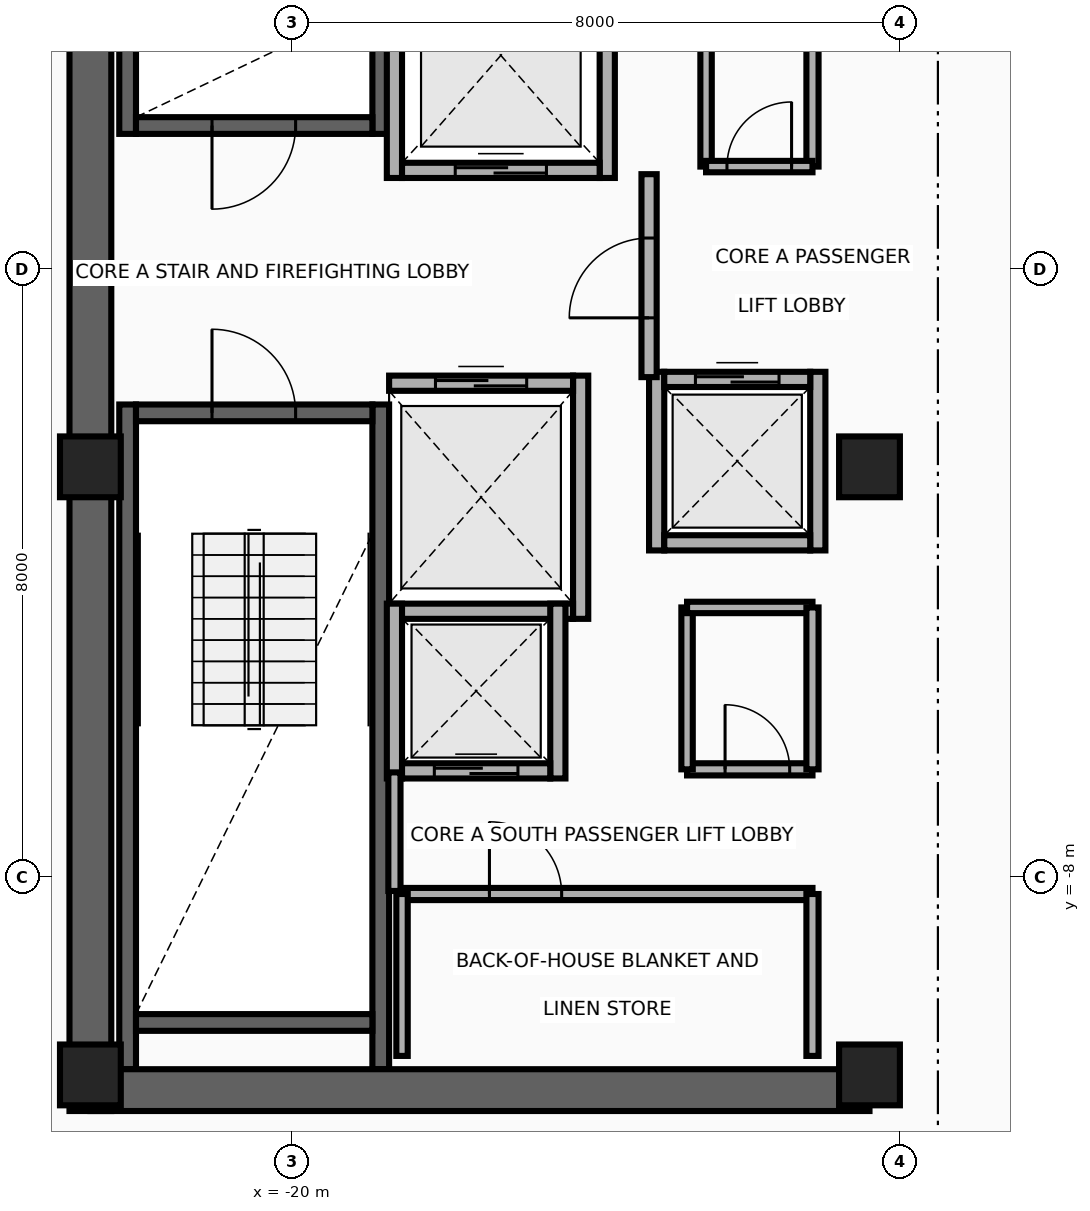
"""IFC4 building model, lengths in metres.
Left out: names, types, materials, properties, quantities, classifications, styles, units other than length and angle.
Written with IfcOpenShell. Run it as: python <this file> out.ifc"""

import sys

from ifc_helpers import new_model, si_unit, direction, frame, frame_2d, origin, origin_2d, place, context, subcontext, project, spatial, rectangle, extrude, source, transform, mapped, element, fill, save


model = new_model("IFC4")
c1 = context("Model", 3, precision=1e-05, world=origin(), true_north=direction((0.0, 1.0)))
c2 = subcontext(c1, "Body", "Model", "MODEL_VIEW")
j1 = project(units=[si_unit("LENGTHUNIT", "METRE"), si_unit("PLANEANGLEUNIT", "RADIAN")], contexts=[c1])
p1 = place(None, origin())
s1 = spatial("IfcSite", under=j1, at=p1, CompositionType="ELEMENT")
p2 = place(p1, origin())
s2 = spatial("IfcBuilding", under=s1, at=p2, CompositionType="ELEMENT")
p3 = place(p2, frame((0.0, 0.0, 254.5)))
s3 = spatial("IfcBuildingStorey", under=s2, at=p3, CompositionType="ELEMENT", Elevation=254.5)
for number, where, z_axis, x_axis in (
    (1, (-22.16, 1.78, 0.0), (0.0, 0.0, 1.0), (0.0, 1.0, 0.0)),
    (2, (-18.83, 1.78, 0.0), (0.0, 0.0, 1.0), (0.0, 1.0, 0.0)),
):
    element("IfcWall", number, at=place(p3, frame(where, z_axis=z_axis, x_axis=x_axis)), inside=s3, PredefinedType="SHEAR", context=c2, shape_type="SweptSolid", body=[
        extrude(rectangle(XDim=8.745, YDim=0.22, at=frame_2d((4.373, 0.0))), origin(), (0.0, 0.0, 1.0), 3.26),
    ])
p4 = place(p3, frame((-22.05, 1.89, 0.0), z_axis=(0.0, 0.0, 1.0), x_axis=(1.0, 0.0, 0.0)))
e3 = element("IfcWall", 3, at=p4, inside=s3, PredefinedType="SHEAR", context=c2, shape_type="SweptSolid", body=[
    extrude(rectangle(XDim=3.11, YDim=0.22, at=frame_2d((1.555, 0.0))), origin(), (0.0, 0.0, 1.0), 3.26),
])
p5 = place(p4, frame((1.0, 0.0, 0.0)))
e4 = element("IfcOpeningElement", 4, at=p5, cuts=e3, PredefinedType="OPENING", context=c2, shape_type="SweptSolid", body=[
    extrude(rectangle(XDim=1.1, YDim=2.15, at=frame_2d((0.55, 1.075))), frame((0.0, 0.125, 0.0), z_axis=(0.0, -1.0, 0.0), x_axis=(1.0, 0.0, 0.0)), (0.0, 0.0, 1.0), 0.25),
])
for number, where, z_axis, x_axis in (
    (5, (-22.16, -10.525, 0.0), (0.0, 0.0, 1.0), (0.0, 1.0, 0.0)),
    (6, (-18.83, -10.525, 0.0), (0.0, 0.0, 1.0), (0.0, 1.0, 0.0)),
):
    element("IfcWall", number, at=place(p3, frame(where, z_axis=z_axis, x_axis=x_axis)), inside=s3, PredefinedType="SHEAR", context=c2, shape_type="SweptSolid", body=[
        extrude(rectangle(XDim=8.745, YDim=0.22, at=frame_2d((4.373, 0.0))), origin(), (0.0, 0.0, 1.0), 3.26),
    ])
p6 = place(p3, frame((-22.05, -9.91, 0.0), z_axis=(0.0, 0.0, 1.0), x_axis=(1.0, 0.0, 0.0)))
e7 = element("IfcWall", 7, at=p6, inside=s3, PredefinedType="SHEAR", context=c2, shape_type="SweptSolid", body=[
    extrude(rectangle(XDim=3.11, YDim=0.22, at=frame_2d((1.555, 0.0))), origin(), (0.0, 0.0, 1.0), 3.26),
])
p7 = place(p3, frame((-22.05, -1.89, 0.0), z_axis=(0.0, 0.0, 1.0), x_axis=(1.0, 0.0, 0.0)))
e8 = element("IfcWall", 8, at=p7, inside=s3, PredefinedType="SHEAR", context=c2, shape_type="SweptSolid", body=[
    extrude(rectangle(XDim=3.11, YDim=0.22, at=frame_2d((1.555, 0.0))), origin(), (0.0, 0.0, 1.0), 3.26),
])
p8 = place(p7, frame((1.0, 0.0, 0.0)))
e9 = element("IfcOpeningElement", 9, at=p8, cuts=e8, PredefinedType="OPENING", context=c2, shape_type="SweptSolid", body=[
    extrude(rectangle(XDim=1.1, YDim=2.15, at=frame_2d((0.55, 1.075))), frame((0.0, 0.125, 0.0), z_axis=(0.0, -1.0, 0.0), x_axis=(1.0, 0.0, 0.0)), (0.0, 0.0, 1.0), 0.25),
])
p9 = place(p3, frame((-22.65, -11.075, 0.0), z_axis=(0.0, 0.0, 1.0), x_axis=(0.0, 1.0, 0.0)))
e10 = element("IfcWall", 10, at=p9, inside=s3, PredefinedType="SHEAR", context=c2, shape_type="SweptSolid", body=[
    extrude(rectangle(XDim=22.15, YDim=0.55, at=frame_2d((11.075, 0.0))), origin(), (0.0, 0.0, 1.0), 3.26),
])
p10 = place(p3, frame((-22.65, -10.8, 0.0), z_axis=(0.0, 0.0, 1.0), x_axis=(1.0, 0.0, 0.0)))
e11 = element("IfcWall", 11, at=p10, inside=s3, PredefinedType="SHEAR", context=c2, shape_type="SweptSolid", body=[
    extrude(rectangle(XDim=10.25, YDim=0.55, at=frame_2d((5.125, 0.0))), origin(), (0.0, 0.0, 1.0), 3.26),
])
m1 = source(origin(), c2, "Body", "SweptSolid", [
    extrude(rectangle(XDim=0.8, YDim=0.8, at=origin_2d()), origin(), (0.0, 0.0, 1.0), 3.5),
])
for number, where, z_axis, x_axis in (
    (12, (-22.65, -10.6, 0.0), (0.0, 0.0, 1.0), (1.0, 0.0, 0.0)),
    (13, (-12.4, -10.6, 0.0), (0.0, 0.0, 1.0), (1.0, 0.0, 0.0)),
    (14, (-22.65, -2.6, 0.0), (0.0, 0.0, 1.0), (1.0, 0.0, 0.0)),
    (15, (-12.4, -2.6, 0.0), (0.0, 0.0, 1.0), (1.0, 0.0, 0.0)),
):
    element("IfcColumn", number, at=place(p3, frame(where, z_axis=z_axis, x_axis=x_axis)), inside=s3, PredefinedType="COLUMN", context=c2, shape_type="MappedRepresentation", body=[
        mapped(m1, transform((0.0, 0.0, 0.0), x_axis=(1.0, 0.0, 0.0), y_axis=(0.0, 1.0, 0.0), z_axis=(0.0, 0.0, 1.0), scale=1.0)),
    ])
for number, where, z_axis, x_axis in (
    (16, (-18.65, 1.2, 0.0), (0.0, 0.0, 1.0), (0.0, 1.0, 0.0)),
    (17, (-15.85, 1.2, 0.0), (0.0, 0.0, 1.0), (0.0, 1.0, 0.0)),
):
    element("IfcWall", number, at=place(p3, frame(where, z_axis=z_axis, x_axis=x_axis)), inside=s3, PredefinedType="MOVABLE", context=c2, shape_type="SweptSolid", body=[
        extrude(rectangle(XDim=3.225, YDim=0.2, at=frame_2d((1.613, 0.0))), origin(), (0.0, 0.0, 1.0), 3.26),
    ])
p11 = place(p3, frame((-18.55, 1.3, 0.0), z_axis=(0.0, 0.0, 1.0), x_axis=(1.0, 0.0, 0.0)))
e18 = element("IfcWall", 18, at=p11, inside=s3, PredefinedType="MOVABLE", context=c2, shape_type="SweptSolid", body=[
    extrude(rectangle(XDim=2.6, YDim=0.2, at=frame_2d((1.3, 0.0))), origin(), (0.0, 0.0, 1.0), 3.26),
])
p12 = place(p11, frame((0.7, 0.0, 0.0)))
e19 = element("IfcOpeningElement", 19, at=p12, cuts=e18, PredefinedType="OPENING", context=c2, shape_type="SweptSolid", body=[
    extrude(rectangle(XDim=1.2, YDim=2.1, at=frame_2d((0.6, 1.05))), frame((0.0, 0.115, 0.0), z_axis=(0.0, -1.0, 0.0), x_axis=(1.0, 0.0, 0.0)), (0.0, 0.0, 1.0), 0.23),
])
p13 = place(p3, frame((-16.2, -4.6, 0.0), z_axis=(0.0, 0.0, 1.0), x_axis=(0.0, 1.0, 0.0)))
e20 = element("IfcWall", 20, at=p13, inside=s3, PredefinedType="MOVABLE", context=c2, shape_type="SweptSolid", body=[
    extrude(rectangle(XDim=3.2, YDim=0.2, at=frame_2d((1.6, 0.0))), origin(), (0.0, 0.0, 1.0), 3.26),
])
p14 = place(p3, frame((-18.72, -4.5, 0.0), z_axis=(0.0, 0.0, 1.0), x_axis=(1.0, 0.0, 0.0)))
e21 = element("IfcWall", 21, at=p14, inside=s3, PredefinedType="MOVABLE", context=c2, shape_type="SweptSolid", body=[
    extrude(rectangle(XDim=2.42, YDim=0.2, at=frame_2d((1.21, 0.0))), origin(), (0.0, 0.0, 1.0), 3.26),
])
p15 = place(p3, frame((-18.72, -1.5, 0.0), z_axis=(0.0, 0.0, 1.0), x_axis=(1.0, 0.0, 0.0)))
e22 = element("IfcWall", 22, at=p15, inside=s3, PredefinedType="MOVABLE", context=c2, shape_type="SweptSolid", body=[
    extrude(rectangle(XDim=2.42, YDim=0.2, at=frame_2d((1.21, 0.0))), origin(), (0.0, 0.0, 1.0), 3.26),
])
p16 = place(p15, frame((0.61, 0.0, 0.0)))
e23 = element("IfcOpeningElement", 23, at=p16, cuts=e22, PredefinedType="OPENING", context=c2, shape_type="SweptSolid", body=[
    extrude(rectangle(XDim=1.2, YDim=2.1, at=frame_2d((0.6, 1.05))), frame((0.0, 0.115, 0.0), z_axis=(0.0, -1.0, 0.0), x_axis=(1.0, 0.0, 0.0)), (0.0, 0.0, 1.0), 0.23),
])
for number, where, z_axis, x_axis in (
    (24, (-18.65, -6.7, 0.0), (0.0, 0.0, 1.0), (0.0, 1.0, 0.0)),
    (25, (-16.5, -6.7, 0.0), (0.0, 0.0, 1.0), (0.0, 1.0, 0.0)),
):
    element("IfcWall", number, at=place(p3, frame(where, z_axis=z_axis, x_axis=x_axis)), inside=s3, PredefinedType="MOVABLE", context=c2, shape_type="SweptSolid", body=[
        extrude(rectangle(XDim=2.3, YDim=0.2, at=frame_2d((1.15, 0.0))), origin(), (0.0, 0.0, 1.0), 3.26),
    ])
p17 = place(p3, frame((-18.55, -6.6, 0.0), z_axis=(0.0, 0.0, 1.0), x_axis=(1.0, 0.0, 0.0)))
e26 = element("IfcWall", 26, at=p17, inside=s3, PredefinedType="MOVABLE", context=c2, shape_type="SweptSolid", body=[
    extrude(rectangle(XDim=1.95, YDim=0.2, at=frame_2d((0.975, 0.0))), origin(), (0.0, 0.0, 1.0), 3.26),
])
p18 = place(p17, frame((0.425, 0.0, 0.0)))
e27 = element("IfcOpeningElement", 27, at=p18, cuts=e26, PredefinedType="OPENING", context=c2, shape_type="SweptSolid", body=[
    extrude(rectangle(XDim=1.1, YDim=2.1, at=frame_2d((0.55, 1.05))), frame((0.0, 0.115, 0.0), z_axis=(0.0, -1.0, 0.0), x_axis=(1.0, 0.0, 0.0)), (0.0, 0.0, 1.0), 0.23),
])
for number, where, z_axis, x_axis in (
    (28, (-15.2, -3.7, 0.0), (0.0, 0.0, 1.0), (0.0, 1.0, 0.0)),
    (29, (-13.08, -3.7, 0.0), (0.0, 0.0, 1.0), (0.0, 1.0, 0.0)),
):
    element("IfcWall", number, at=place(p3, frame(where, z_axis=z_axis, x_axis=x_axis)), inside=s3, PredefinedType="MOVABLE", context=c2, shape_type="SweptSolid", body=[
        extrude(rectangle(XDim=2.35, YDim=0.2, at=frame_2d((1.175, 0.0))), origin(), (0.0, 0.0, 1.0), 3.26),
    ])
p19 = place(p3, frame((-15.1, -3.6, 0.0), z_axis=(0.0, 0.0, 1.0), x_axis=(1.0, 0.0, 0.0)))
e30 = element("IfcWall", 30, at=p19, inside=s3, PredefinedType="MOVABLE", context=c2, shape_type="SweptSolid", body=[
    extrude(rectangle(XDim=1.92, YDim=0.2, at=frame_2d((0.96, 0.0))), origin(), (0.0, 0.0, 1.0), 3.26),
])
p20 = place(p3, frame((-15.1, -1.45, 0.0), z_axis=(0.0, 0.0, 1.0), x_axis=(1.0, 0.0, 0.0)))
e31 = element("IfcWall", 31, at=p20, inside=s3, PredefinedType="MOVABLE", context=c2, shape_type="SweptSolid", body=[
    extrude(rectangle(XDim=1.92, YDim=0.2, at=frame_2d((0.96, 0.0))), origin(), (0.0, 0.0, 1.0), 3.26),
])
p21 = place(p20, frame((0.41, 0.0, 0.0)))
e32 = element("IfcOpeningElement", 32, at=p21, cuts=e31, PredefinedType="OPENING", context=c2, shape_type="SweptSolid", body=[
    extrude(rectangle(XDim=1.1, YDim=2.1, at=frame_2d((0.55, 1.05))), frame((0.0, 0.115, 0.0), z_axis=(0.0, -1.0, 0.0), x_axis=(1.0, 0.0, 0.0)), (0.0, 0.0, 1.0), 0.23),
])
p22 = place(p3, frame((-15.3, -1.42, 0.0), z_axis=(0.0, 0.0, 1.0), x_axis=(0.0, 1.0, 0.0)))
e33 = element("IfcWall", 33, at=p22, inside=s3, PredefinedType="PARTITIONING", context=c2, shape_type="SweptSolid", body=[
    extrude(rectangle(XDim=2.67, YDim=0.2, at=frame_2d((1.335, 0.0))), origin(), (0.0, 0.0, 1.0), 3.26),
])
p23 = place(p22, frame((0.78, 0.0, 0.0)))
e34 = element("IfcOpeningElement", 34, at=p23, cuts=e33, PredefinedType="OPENING", context=c2, shape_type="SweptSolid", body=[
    extrude(rectangle(XDim=1.05, YDim=2.15, at=frame_2d((0.525, 1.075))), frame((0.0, 0.115, 0.0), z_axis=(0.0, -1.0, 0.0), x_axis=(1.0, 0.0, 0.0)), (0.0, 0.0, 1.0), 0.23),
])
p24 = place(p3, frame((-18.65, -8.18, 0.0), z_axis=(0.0, 0.0, 1.0), x_axis=(0.0, 1.0, 0.0)))
e35 = element("IfcWall", 35, at=p24, inside=s3, PredefinedType="PARTITIONING", context=c2, shape_type="SweptSolid", body=[
    extrude(rectangle(XDim=1.56, YDim=0.16, at=frame_2d((0.78, 0.0))), origin(), (0.0, 0.0, 1.0), 3.26),
])
p25 = place(p3, frame((-18.55, -8.22, 0.0), z_axis=(0.0, 0.0, 1.0), x_axis=(1.0, 0.0, 0.0)))
e36 = element("IfcWall", 36, at=p25, inside=s3, PredefinedType="PARTITIONING", context=c2, shape_type="SweptSolid", body=[
    extrude(rectangle(XDim=5.4, YDim=0.16, at=frame_2d((2.7, 0.0))), origin(), (0.0, 0.0, 1.0), 3.26),
])
p26 = place(p25, frame((1.15, 0.0, 0.0)))
e37 = element("IfcOpeningElement", 37, at=p26, cuts=e36, PredefinedType="OPENING", context=c2, shape_type="SweptSolid", body=[
    extrude(rectangle(XDim=0.95, YDim=2.15, at=frame_2d((0.475, 1.075))), frame((0.0, 0.095, 0.0), z_axis=(0.0, -1.0, 0.0), x_axis=(1.0, 0.0, 0.0)), (0.0, 0.0, 1.0), 0.19),
])
p27 = place(p3, frame((-18.55, -10.35, 0.0), z_axis=(0.0, 0.0, 1.0), x_axis=(0.0, 1.0, 0.0)))
e38 = element("IfcWall", 38, at=p27, inside=s3, PredefinedType="PARTITIONING", context=c2, shape_type="SweptSolid", body=[
    extrude(rectangle(XDim=2.13, YDim=0.15, at=frame_2d((1.065, 0.0))), origin(), (0.0, 0.0, 1.0), 3.26),
])
p28 = place(p3, frame((-13.15, -10.35, 0.0), z_axis=(0.0, 0.0, 1.0), x_axis=(0.0, 1.0, 0.0)))
e39 = element("IfcWall", 39, at=p28, inside=s3, PredefinedType="PARTITIONING", context=c2, shape_type="SweptSolid", body=[
    extrude(rectangle(XDim=2.13, YDim=0.16, at=frame_2d((1.065, 0.0))), origin(), (0.0, 0.0, 1.0), 3.26),
])
p29 = place(p3, frame((-14.8, -6.58, 0.0), z_axis=(0.0, 0.0, 1.0), x_axis=(1.0, 0.0, 0.0)))
e40 = element("IfcWall", 40, at=p29, inside=s3, PredefinedType="PARTITIONING", context=c2, shape_type="SweptSolid", body=[
    extrude(rectangle(XDim=1.65, YDim=0.16, at=frame_2d((0.825, 0.0))), origin(), (0.0, 0.0, 1.0), 3.26),
])
p30 = place(p29, frame((0.5, 0.0, 0.0)))
e41 = element("IfcOpeningElement", 41, at=p30, cuts=e40, PredefinedType="OPENING", context=c2, shape_type="SweptSolid", body=[
    extrude(rectangle(XDim=0.85, YDim=2.05, at=frame_2d((0.425, 1.025))), frame((0.0, 0.095, 0.0), z_axis=(0.0, -1.0, 0.0), x_axis=(1.0, 0.0, 0.0)), (0.0, 0.0, 1.0), 0.19),
])
p31 = place(p3, frame((-14.8, -6.58, 0.0), z_axis=(0.0, 0.0, 1.0), x_axis=(0.0, 1.0, 0.0)))
e42 = element("IfcWall", 42, at=p31, inside=s3, PredefinedType="PARTITIONING", context=c2, shape_type="SweptSolid", body=[
    extrude(rectangle(XDim=2.13, YDim=0.15, at=frame_2d((1.065, 0.0))), origin(), (0.0, 0.0, 1.0), 3.26),
])
p32 = place(p3, frame((-14.8, -4.45, 0.0), z_axis=(0.0, 0.0, 1.0), x_axis=(1.0, 0.0, 0.0)))
e43 = element("IfcWall", 43, at=p32, inside=s3, PredefinedType="PARTITIONING", context=c2, shape_type="SweptSolid", body=[
    extrude(rectangle(XDim=1.65, YDim=0.15, at=frame_2d((0.825, 0.0))), origin(), (0.0, 0.0, 1.0), 3.26),
])
p33 = place(p3, frame((-13.15, -6.58, 0.0), z_axis=(0.0, 0.0, 1.0), x_axis=(0.0, 1.0, 0.0)))
e44 = element("IfcWall", 44, at=p33, inside=s3, PredefinedType="PARTITIONING", context=c2, shape_type="SweptSolid", body=[
    extrude(rectangle(XDim=2.13, YDim=0.16, at=frame_2d((1.065, 0.0))), origin(), (0.0, 0.0, 1.0), 3.26),
])
p34 = place(p3, frame((-13.15, 1.35, 0.0), z_axis=(0.0, 0.0, 1.0), x_axis=(0.0, 1.0, 0.0)))
e45 = element("IfcWall", 45, at=p34, inside=s3, PredefinedType="PARTITIONING", context=c2, shape_type="SweptSolid", body=[
    extrude(rectangle(XDim=1.95, YDim=0.16, at=frame_2d((0.975, 0.0))), origin(), (0.0, 0.0, 1.0), 3.26),
])
p35 = place(p3, frame((-14.55, 1.35, 0.0), z_axis=(0.0, 0.0, 1.0), x_axis=(0.0, 1.0, 0.0)))
e46 = element("IfcWall", 46, at=p35, inside=s3, PredefinedType="PARTITIONING", context=c2, shape_type="SweptSolid", body=[
    extrude(rectangle(XDim=1.95, YDim=0.15, at=frame_2d((0.975, 0.0))), origin(), (0.0, 0.0, 1.0), 3.26),
])
p36 = place(p3, frame((-14.55, 1.35, 0.0), z_axis=(0.0, 0.0, 1.0), x_axis=(1.0, 0.0, 0.0)))
e47 = element("IfcWall", 47, at=p36, inside=s3, PredefinedType="PARTITIONING", context=c2, shape_type="SweptSolid", body=[
    extrude(rectangle(XDim=1.4, YDim=0.15, at=frame_2d((0.7, 0.0))), origin(), (0.0, 0.0, 1.0), 3.26),
])
p37 = place(p36, frame((0.275, 0.0, 0.0)))
e48 = element("IfcOpeningElement", 48, at=p37, cuts=e47, PredefinedType="OPENING", context=c2, shape_type="SweptSolid", body=[
    extrude(rectangle(XDim=0.85, YDim=2.05, at=frame_2d((0.425, 1.025))), frame((0.0, 0.09, 0.0), z_axis=(0.0, -1.0, 0.0), x_axis=(1.0, 0.0, 0.0)), (0.0, 0.0, 1.0), 0.18),
])
p38 = place(p12, origin())
e49 = element("IfcDoor", 49, at=p38, inside=s3, OperationType="DOUBLE_DOOR_SLIDING", PredefinedType="DOOR", context=c2, shape_type="SweptSolid", body=[
    extrude(rectangle(XDim=1.2, YDim=2.1, at=frame_2d((0.6, 1.05))), frame((0.0, 0.025, 0.0), z_axis=(0.0, -1.0, 0.0), x_axis=(1.0, 0.0, 0.0)), (0.0, 0.0, 1.0), 0.05),
])
fill(e19, e49)
p39 = place(p16, origin())
e50 = element("IfcDoor", 50, at=p39, inside=s3, OperationType="DOUBLE_DOOR_SLIDING", PredefinedType="DOOR", context=c2, shape_type="SweptSolid", body=[
    extrude(rectangle(XDim=1.2, YDim=2.1, at=frame_2d((0.6, 1.05))), frame((0.0, 0.025, 0.0), z_axis=(0.0, -1.0, 0.0), x_axis=(1.0, 0.0, 0.0)), (0.0, 0.0, 1.0), 0.05),
])
fill(e23, e50)
p40 = place(p18, origin())
e51 = element("IfcDoor", 51, at=p40, inside=s3, OperationType="DOUBLE_DOOR_SLIDING", PredefinedType="DOOR", context=c2, shape_type="SweptSolid", body=[
    extrude(rectangle(XDim=1.1, YDim=2.1, at=frame_2d((0.55, 1.05))), frame((0.0, 0.025, 0.0), z_axis=(0.0, -1.0, 0.0), x_axis=(1.0, 0.0, 0.0)), (0.0, 0.0, 1.0), 0.05),
])
fill(e27, e51)
p41 = place(p21, origin())
e52 = element("IfcDoor", 52, at=p41, inside=s3, OperationType="DOUBLE_DOOR_SLIDING", PredefinedType="DOOR", context=c2, shape_type="SweptSolid", body=[
    extrude(rectangle(XDim=1.1, YDim=2.1, at=frame_2d((0.55, 1.05))), frame((0.0, 0.025, 0.0), z_axis=(0.0, -1.0, 0.0), x_axis=(1.0, 0.0, 0.0)), (0.0, 0.0, 1.0), 0.05),
])
fill(e32, e52)
p42 = place(p23, origin())
e53 = element("IfcDoor", 53, at=p42, inside=s3, OperationType="SINGLE_SWING_RIGHT", PredefinedType="DOOR", context=c2, shape_type="SweptSolid", body=[
    extrude(rectangle(XDim=1.05, YDim=2.15, at=frame_2d((0.525, 1.075))), frame((0.0, 0.025, 0.0), z_axis=(0.0, -1.0, 0.0), x_axis=(1.0, 0.0, 0.0)), (0.0, 0.0, 1.0), 0.05),
])
fill(e34, e53)
p43 = place(p5, frame((1.1, 0.0, 0.0), z_axis=(0.0, 0.0, 1.0), x_axis=(-1.0, 0.0, 0.0)))
e54 = element("IfcDoor", 54, at=p43, inside=s3, OperationType="SINGLE_SWING_LEFT", PredefinedType="DOOR", context=c2, shape_type="SweptSolid", body=[
    extrude(rectangle(XDim=1.1, YDim=2.15, at=frame_2d((0.55, 1.075))), frame((0.0, 0.025, 0.0), z_axis=(0.0, -1.0, 0.0), x_axis=(1.0, 0.0, 0.0)), (0.0, 0.0, 1.0), 0.05),
])
fill(e4, e54)
p44 = place(p8, origin())
e55 = element("IfcDoor", 55, at=p44, inside=s3, OperationType="SINGLE_SWING_RIGHT", PredefinedType="DOOR", context=c2, shape_type="SweptSolid", body=[
    extrude(rectangle(XDim=1.1, YDim=2.15, at=frame_2d((0.55, 1.075))), frame((0.0, 0.025, 0.0), z_axis=(0.0, -1.0, 0.0), x_axis=(1.0, 0.0, 0.0)), (0.0, 0.0, 1.0), 0.05),
])
fill(e9, e55)
p45 = place(p26, origin())
e56 = element("IfcDoor", 56, at=p45, inside=s3, OperationType="SINGLE_SWING_RIGHT", PredefinedType="DOOR", context=c2, shape_type="SweptSolid", body=[
    extrude(rectangle(XDim=0.95, YDim=2.15, at=frame_2d((0.475, 1.075))), frame((0.0, 0.025, 0.0), z_axis=(0.0, -1.0, 0.0), x_axis=(1.0, 0.0, 0.0)), (0.0, 0.0, 1.0), 0.05),
])
fill(e37, e56)
p46 = place(p30, origin())
e57 = element("IfcDoor", 57, at=p46, inside=s3, OperationType="SINGLE_SWING_LEFT", PredefinedType="DOOR", context=c2, shape_type="SweptSolid", body=[
    extrude(rectangle(XDim=0.85, YDim=2.05, at=frame_2d((0.425, 1.025))), frame((0.0, 0.025, 0.0), z_axis=(0.0, -1.0, 0.0), x_axis=(1.0, 0.0, 0.0)), (0.0, 0.0, 1.0), 0.05),
])
fill(e41, e57)
p47 = place(p37, origin())
e58 = element("IfcDoor", 58, at=p47, inside=s3, OperationType="SINGLE_SWING_RIGHT", PredefinedType="DOOR", context=c2, shape_type="SweptSolid", body=[
    extrude(rectangle(XDim=0.85, YDim=2.05, at=frame_2d((0.425, 1.025))), frame((0.0, 0.025, 0.0), z_axis=(0.0, -1.0, 0.0), x_axis=(1.0, 0.0, 0.0)), (0.0, 0.0, 1.0), 0.05),
])
fill(e48, e58)
save(model, sys.argv[1])
